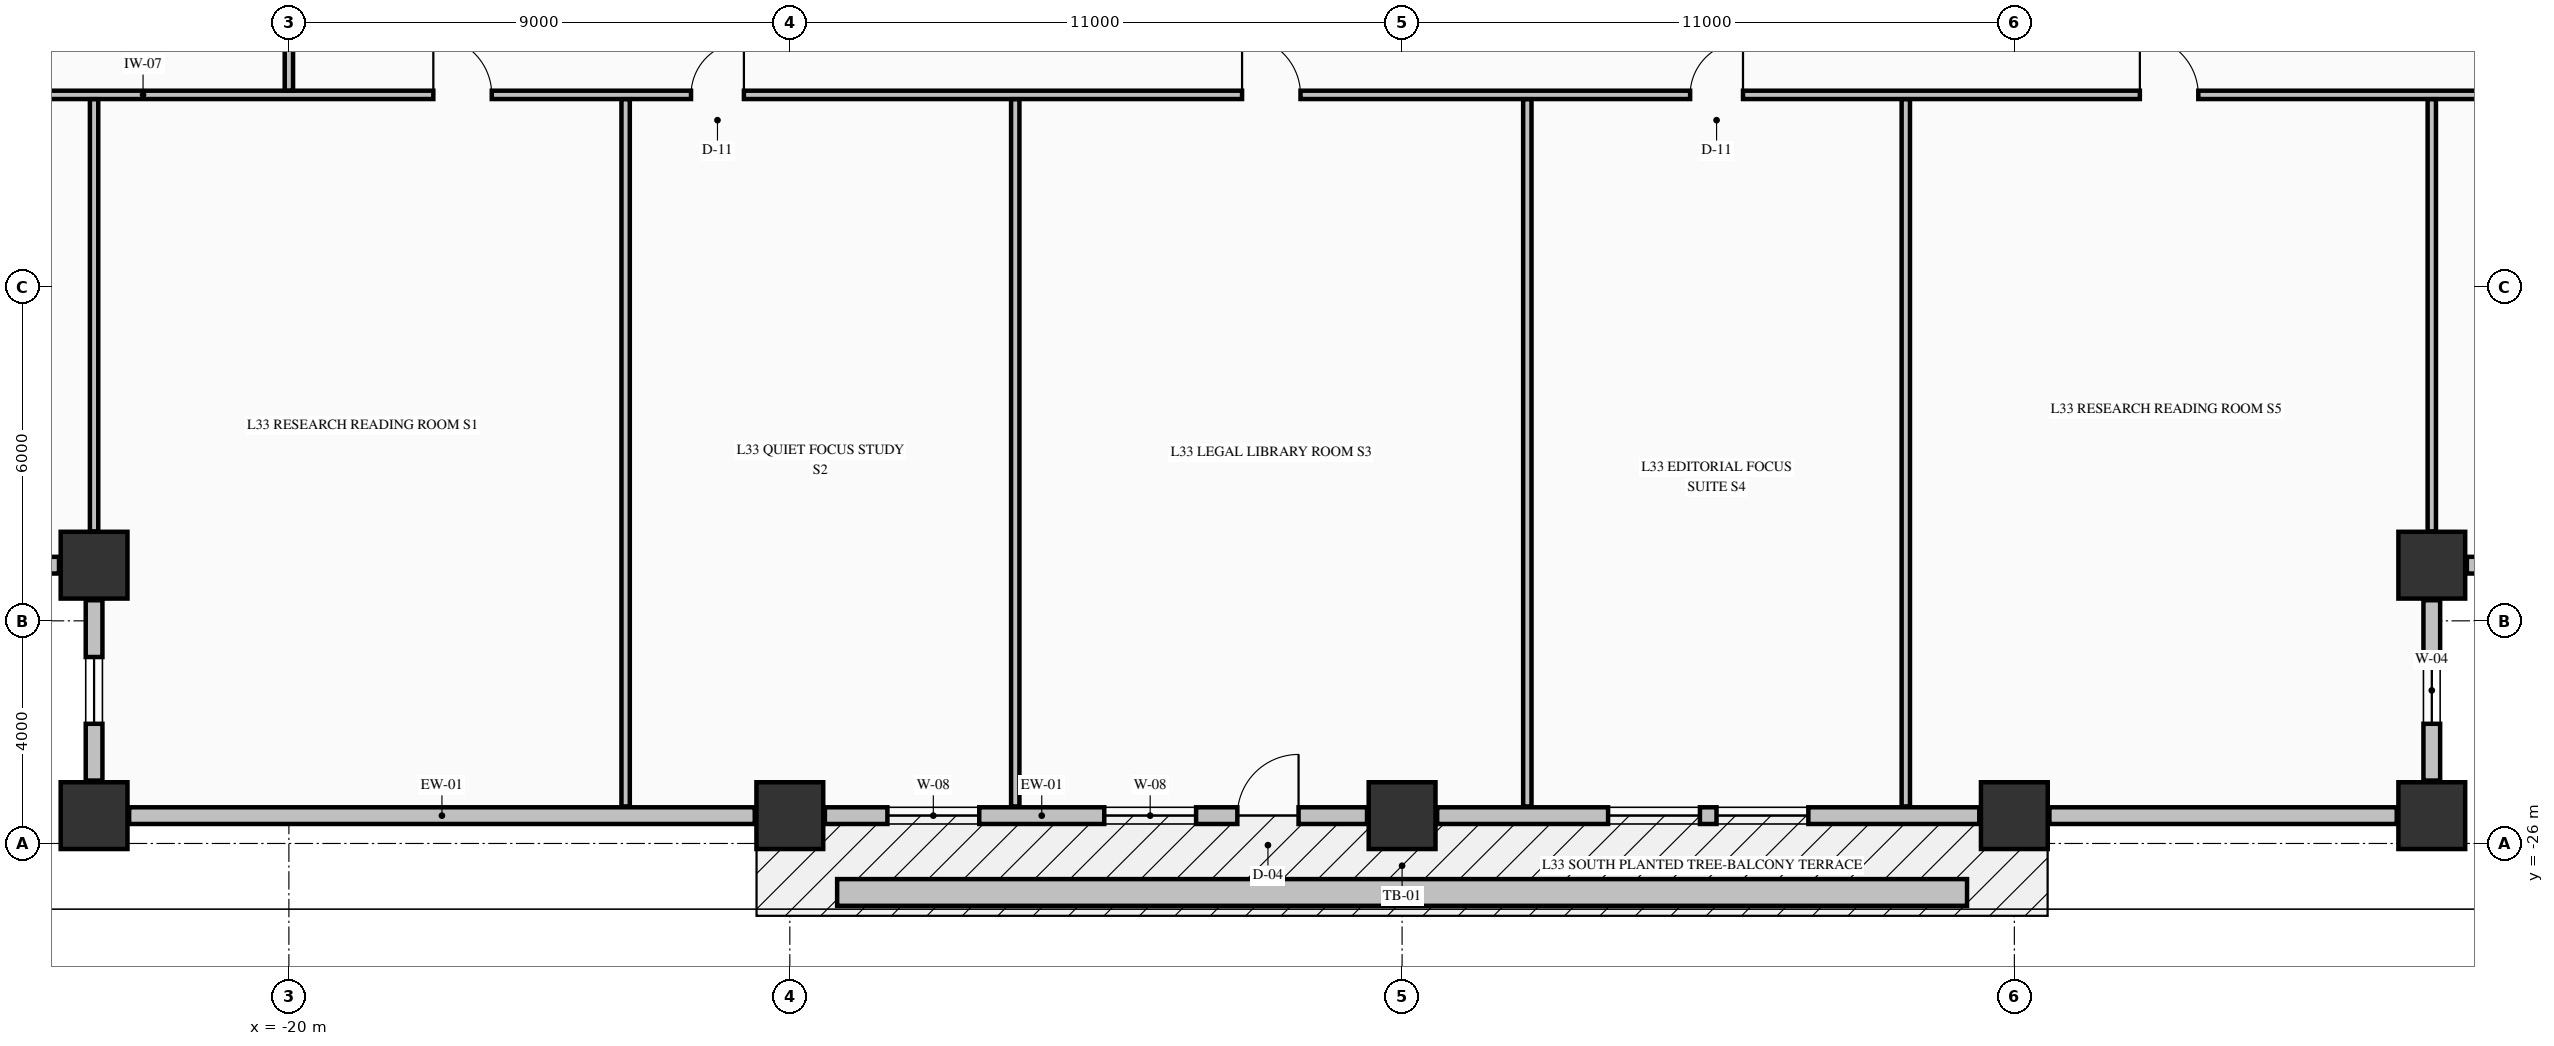
"""IFC4 building model, lengths in metres.
Left out: names, types, materials, properties, quantities, classifications, styles, units other than length and angle.
Written with IfcOpenShell. Run it as: python <this file> out.ifc"""

import sys

from ifc_helpers import new_model, si_unit, direction, frame, frame_2d, origin, origin_2d, place, context, subcontext, project, spatial, rectangle, extrude, element, fill, save


model = new_model("IFC4")
c1 = context("Model", 3, precision=1e-05, world=origin(), true_north=direction((0.0, 1.0)))
c2 = subcontext(c1, "Body", "Model", "MODEL_VIEW")
j1 = project(units=[si_unit("LENGTHUNIT", "METRE"), si_unit("PLANEANGLEUNIT", "RADIAN")], contexts=[c1])
p1 = place(None, origin())
s1 = spatial("IfcSite", under=j1, at=p1, CompositionType="ELEMENT")
p2 = place(p1, origin())
s2 = spatial("IfcBuilding", under=s1, at=p2, CompositionType="ELEMENT")
p3 = place(p2, frame((0.0, 0.0, 132.06)))
s3 = spatial("IfcBuildingStorey", under=s2, at=p3, CompositionType="ELEMENT", Elevation=132.06)
for number, where, z_axis, x_axis in (
    (1, (-23.5, -25.5, -0.25), (0.0, 0.0, 1.0), (1.0, 0.0, 0.0)),
    (2, (-11.0, -25.5, -0.25), (0.0, 0.0, 1.0), (1.0, 0.0, 0.0)),
    (3, (0.0, -25.5, -0.25), (0.0, 0.0, 1.0), (1.0, 0.0, 0.0)),
    (4, (11.0, -25.5, -0.25), (0.0, 0.0, 1.0), (1.0, 0.0, 0.0)),
    (5, (18.5, -25.5, -0.25), (0.0, 0.0, 1.0), (1.0, 0.0, 0.0)),
    (6, (-23.5, -21.0, -0.25), (0.0, 0.0, 1.0), (1.0, 0.0, 0.0)),
    (7, (18.5, -21.0, -0.25), (0.0, 0.0, 1.0), (1.0, 0.0, 0.0)),
):
    element("IfcColumn", number, at=place(p3, frame(where, z_axis=z_axis, x_axis=x_axis)), inside=s3, PredefinedType="COLUMN", context=c2, shape_type="SweptSolid", body=[
        extrude(rectangle(XDim=1.2, YDim=1.2, at=origin_2d()), origin(), (0.0, 0.0, 1.0), 3.57),
    ])
p4 = place(p3, frame((18.5, -24.87, 0.0), z_axis=(0.0, 0.0, 1.0), x_axis=(0.0, 1.0, 0.0)))
e8 = element("IfcWall", 8, at=p4, inside=s3, PredefinedType="STANDARD", context=c2, shape_type="SweptSolid", body=[
    extrude(rectangle(XDim=3.24, YDim=0.3, at=frame_2d((1.62, 0.0))), origin(), (0.0, 0.0, 1.0), 2.712),
])
p5 = place(p4, frame((1.02, 0.0, 0.82)))
e9 = element("IfcOpeningElement", 9, at=p5, cuts=e8, PredefinedType="OPENING", context=c2, shape_type="SweptSolid", body=[
    extrude(rectangle(XDim=1.2, YDim=1.65, at=frame_2d((0.6, 0.825))), frame((0.0, 0.16, 0.0), z_axis=(0.0, -1.0, 0.0), x_axis=(1.0, 0.0, 0.0)), (0.0, 0.0, 1.0), 0.32),
])
p6 = place(p3, frame((19.13, -21.0, 0.0), z_axis=(0.0, 0.0, 1.0), x_axis=(1.0, 0.0, 0.0)))
e10 = element("IfcWall", 10, at=p6, inside=s3, PredefinedType="STANDARD", context=c2, shape_type="SweptSolid", body=[
    extrude(rectangle(XDim=3.24, YDim=0.3, at=frame_2d((1.62, 0.0))), origin(), (0.0, 0.0, 1.0), 2.712),
])
p7 = place(p6, frame((1.02, 0.0, 0.82)))
e11 = element("IfcOpeningElement", 11, at=p7, cuts=e10, PredefinedType="OPENING", context=c2, shape_type="SweptSolid", body=[
    extrude(rectangle(XDim=1.2, YDim=1.65, at=frame_2d((0.6, 0.825))), frame((0.0, 0.16, 0.0), z_axis=(0.0, -1.0, 0.0), x_axis=(1.0, 0.0, 0.0)), (0.0, 0.0, 1.0), 0.32),
])
p8 = place(p3, frame((-27.37, -21.0, 0.0), z_axis=(0.0, 0.0, 1.0), x_axis=(1.0, 0.0, 0.0)))
e12 = element("IfcWall", 12, at=p8, inside=s3, PredefinedType="STANDARD", context=c2, shape_type="SweptSolid", body=[
    extrude(rectangle(XDim=3.24, YDim=0.3, at=frame_2d((1.62, 0.0))), origin(), (0.0, 0.0, 1.0), 2.712),
])
p9 = place(p8, frame((1.02, 0.0, 0.82)))
e13 = element("IfcOpeningElement", 13, at=p9, cuts=e12, PredefinedType="OPENING", context=c2, shape_type="SweptSolid", body=[
    extrude(rectangle(XDim=1.2, YDim=1.65, at=frame_2d((0.6, 0.825))), frame((0.0, 0.16, 0.0), z_axis=(0.0, -1.0, 0.0), x_axis=(1.0, 0.0, 0.0)), (0.0, 0.0, 1.0), 0.32),
])
p10 = place(p3, frame((-23.5, -21.63, 0.0), z_axis=(0.0, 0.0, 1.0), x_axis=(0.0, -1.0, 0.0)))
e14 = element("IfcWall", 14, at=p10, inside=s3, PredefinedType="STANDARD", context=c2, shape_type="SweptSolid", body=[
    extrude(rectangle(XDim=3.24, YDim=0.3, at=frame_2d((1.62, 0.0))), origin(), (0.0, 0.0, 1.0), 2.712),
])
p11 = place(p10, frame((1.02, 0.0, 0.82)))
e15 = element("IfcOpeningElement", 15, at=p11, cuts=e14, PredefinedType="OPENING", context=c2, shape_type="SweptSolid", body=[
    extrude(rectangle(XDim=1.2, YDim=1.65, at=frame_2d((0.6, 0.825))), frame((0.0, 0.16, 0.0), z_axis=(0.0, -1.0, 0.0), x_axis=(1.0, 0.0, 0.0)), (0.0, 0.0, 1.0), 0.32),
])
p12 = place(p3, frame((-22.87, -25.5, 0.0), z_axis=(0.0, 0.0, 1.0), x_axis=(1.0, 0.0, 0.0)))
e16 = element("IfcWall", 16, at=p12, inside=s3, PredefinedType="STANDARD", context=c2, shape_type="SweptSolid", body=[
    extrude(rectangle(XDim=11.24, YDim=0.3, at=frame_2d((5.62, 0.0))), origin(), (0.0, 0.0, 1.0), 2.712),
])
p13 = place(p3, frame((-10.37, -25.5, 0.0), z_axis=(0.0, 0.0, 1.0), x_axis=(1.0, 0.0, 0.0)))
e17 = element("IfcWall", 17, at=p13, inside=s3, PredefinedType="STANDARD", context=c2, shape_type="SweptSolid", body=[
    extrude(rectangle(XDim=9.74, YDim=0.3, at=frame_2d((4.87, 0.0))), origin(), (0.0, 0.0, 1.0), 2.712),
])
p14 = place(p13, frame((7.41, 0.0, 0.0)))
e18 = element("IfcOpeningElement", 18, at=p14, cuts=e17, PredefinedType="OPENING", context=c2, shape_type="SweptSolid", body=[
    extrude(rectangle(XDim=1.1, YDim=2.15, at=frame_2d((0.55, 1.075))), frame((0.0, 0.16, 0.0), z_axis=(0.0, -1.0, 0.0), x_axis=(1.0, 0.0, 0.0)), (0.0, 0.0, 1.0), 0.32),
])
p15 = place(p13, frame((1.123, 0.0, 0.8)))
e19 = element("IfcOpeningElement", 19, at=p15, cuts=e17, PredefinedType="OPENING", context=c2, shape_type="SweptSolid", body=[
    extrude(rectangle(XDim=1.65, YDim=1.7, at=frame_2d((0.825, 0.85))), frame((0.0, 0.16, 0.0), z_axis=(0.0, -1.0, 0.0), x_axis=(1.0, 0.0, 0.0)), (0.0, 0.0, 1.0), 0.32),
])
p16 = place(p13, frame((5.019, 0.0, 0.8)))
e20 = element("IfcOpeningElement", 20, at=p16, cuts=e17, PredefinedType="OPENING", context=c2, shape_type="SweptSolid", body=[
    extrude(rectangle(XDim=1.65, YDim=1.7, at=frame_2d((0.825, 0.85))), frame((0.0, 0.16, 0.0), z_axis=(0.0, -1.0, 0.0), x_axis=(1.0, 0.0, 0.0)), (0.0, 0.0, 1.0), 0.32),
])
p17 = place(p3, frame((0.63, -25.5, 0.0), z_axis=(0.0, 0.0, 1.0), x_axis=(1.0, 0.0, 0.0)))
e21 = element("IfcWall", 21, at=p17, inside=s3, PredefinedType="STANDARD", context=c2, shape_type="SweptSolid", body=[
    extrude(rectangle(XDim=9.74, YDim=0.3, at=frame_2d((4.87, 0.0))), origin(), (0.0, 0.0, 1.0), 2.712),
])
p18 = place(p17, frame((3.071, 0.0, 0.8)))
e22 = element("IfcOpeningElement", 22, at=p18, cuts=e21, PredefinedType="OPENING", context=c2, shape_type="SweptSolid", body=[
    extrude(rectangle(XDim=1.65, YDim=1.7, at=frame_2d((0.825, 0.85))), frame((0.0, 0.16, 0.0), z_axis=(0.0, -1.0, 0.0), x_axis=(1.0, 0.0, 0.0)), (0.0, 0.0, 1.0), 0.32),
])
p19 = place(p17, frame((5.019, 0.0, 0.8)))
e23 = element("IfcOpeningElement", 23, at=p19, cuts=e21, PredefinedType="OPENING", context=c2, shape_type="SweptSolid", body=[
    extrude(rectangle(XDim=1.65, YDim=1.7, at=frame_2d((0.825, 0.85))), frame((0.0, 0.16, 0.0), z_axis=(0.0, -1.0, 0.0), x_axis=(1.0, 0.0, 0.0)), (0.0, 0.0, 1.0), 0.32),
])
p20 = place(p3, frame((11.63, -25.5, 0.0), z_axis=(0.0, 0.0, 1.0), x_axis=(1.0, 0.0, 0.0)))
e24 = element("IfcWall", 24, at=p20, inside=s3, PredefinedType="STANDARD", context=c2, shape_type="SweptSolid", body=[
    extrude(rectangle(XDim=6.24, YDim=0.3, at=frame_2d((3.12, 0.0))), origin(), (0.0, 0.0, 1.0), 2.712),
])
p21 = place(p3, frame((-27.835, -12.55, 0.0), z_axis=(0.0, 0.0, 1.0), x_axis=(1.0, 0.0, 0.0)))
e25 = element("IfcWall", 25, at=p21, inside=s3, PredefinedType="PARTITIONING", context=c2, shape_type="SweptSolid", body=[
    extrude(rectangle(XDim=50.67, YDim=0.15, at=frame_2d((25.335, 0.0))), origin(), (0.0, 0.0, 1.0), 3.32),
])
p22 = place(p21, frame((10.43, 0.0, 0.0)))
e26 = element("IfcOpeningElement", 26, at=p22, cuts=e25, PredefinedType="OPENING", context=c2, shape_type="SweptSolid", body=[
    extrude(rectangle(XDim=1.05, YDim=2.15, at=frame_2d((0.525, 1.075))), frame((0.0, 0.085, 0.0), z_axis=(0.0, -1.0, 0.0), x_axis=(1.0, 0.0, 0.0)), (0.0, 0.0, 1.0), 0.17),
])
p23 = place(p21, frame((15.06, 0.0, 0.0)))
e27 = element("IfcOpeningElement", 27, at=p23, cuts=e25, PredefinedType="OPENING", context=c2, shape_type="SweptSolid", body=[
    extrude(rectangle(XDim=0.95, YDim=2.15, at=frame_2d((0.475, 1.075))), frame((0.0, 0.085, 0.0), z_axis=(0.0, -1.0, 0.0), x_axis=(1.0, 0.0, 0.0)), (0.0, 0.0, 1.0), 0.17),
])
p24 = place(p21, frame((24.96, 0.0, 0.0)))
e28 = element("IfcOpeningElement", 28, at=p24, cuts=e25, PredefinedType="OPENING", context=c2, shape_type="SweptSolid", body=[
    extrude(rectangle(XDim=1.05, YDim=2.15, at=frame_2d((0.525, 1.075))), frame((0.0, 0.085, 0.0), z_axis=(0.0, -1.0, 0.0), x_axis=(1.0, 0.0, 0.0)), (0.0, 0.0, 1.0), 0.17),
])
p25 = place(p21, frame((33.01, 0.0, 0.0)))
e29 = element("IfcOpeningElement", 29, at=p25, cuts=e25, PredefinedType="OPENING", context=c2, shape_type="SweptSolid", body=[
    extrude(rectangle(XDim=0.95, YDim=2.15, at=frame_2d((0.475, 1.075))), frame((0.0, 0.085, 0.0), z_axis=(0.0, -1.0, 0.0), x_axis=(1.0, 0.0, 0.0)), (0.0, 0.0, 1.0), 0.17),
])
p26 = place(p21, frame((41.09, 0.0, 0.0)))
e30 = element("IfcOpeningElement", 30, at=p26, cuts=e25, PredefinedType="OPENING", context=c2, shape_type="SweptSolid", body=[
    extrude(rectangle(XDim=1.05, YDim=2.15, at=frame_2d((0.525, 1.075))), frame((0.0, 0.085, 0.0), z_axis=(0.0, -1.0, 0.0), x_axis=(1.0, 0.0, 0.0)), (0.0, 0.0, 1.0), 0.17),
])
p27 = place(p3, frame((-23.5, -20.394, 0.0), z_axis=(0.0, 0.0, 1.0), x_axis=(0.0, 1.0, 0.0)))
e31 = element("IfcWall", 31, at=p27, inside=s3, PredefinedType="PARTITIONING", context=c2, shape_type="SweptSolid", body=[
    extrude(rectangle(XDim=7.766, YDim=0.15, at=frame_2d((3.883, 0.0))), origin(), (0.0, 0.0, 1.0), 3.32),
])
p28 = place(p3, frame((-20.0, -12.472, 0.0), z_axis=(0.0, 0.0, 1.0), x_axis=(0.0, 1.0, 0.0)))
e32 = element("IfcWall", 32, at=p28, inside=s3, PredefinedType="PARTITIONING", context=c2, shape_type="SweptSolid", body=[
    extrude(rectangle(XDim=2.016, YDim=0.15, at=frame_2d((1.008, 0.0))), origin(), (0.0, 0.0, 1.0), 2.81),
])
p29 = place(p28, frame((0.747, 0.0, 0.0)))
e33 = element("IfcOpeningElement", 33, at=p29, cuts=e32, PredefinedType="OPENING", context=c2, shape_type="SweptSolid", body=[
    extrude(rectangle(XDim=0.95, YDim=2.15, at=frame_2d((0.475, 1.075))), frame((0.0, 0.085, 0.0), z_axis=(0.0, -1.0, 0.0), x_axis=(1.0, 0.0, 0.0)), (0.0, 0.0, 1.0), 0.17),
])
for number, where, z_axis, x_axis in (
    (34, (-13.95, -25.335, 0.0), (0.0, 0.0, 1.0), (0.0, 1.0, 0.0)),
    (35, (-6.95, -25.335, 0.0), (0.0, 0.0, 1.0), (0.0, 1.0, 0.0)),
    (36, (2.25, -25.335, 0.0), (0.0, 0.0, 1.0), (0.0, 1.0, 0.0)),
    (37, (9.05, -25.335, 0.0), (0.0, 0.0, 1.0), (0.0, 1.0, 0.0)),
):
    element("IfcWall", number, at=place(p3, frame(where, z_axis=z_axis, x_axis=x_axis)), inside=s3, PredefinedType="PARTITIONING", context=c2, shape_type="SweptSolid", body=[
        extrude(rectangle(XDim=12.707, YDim=0.15, at=frame_2d((6.354, 0.0))), origin(), (0.0, 0.0, 1.0), 3.32),
    ])
p30 = place(p3, frame((18.5, -20.394, 0.0), z_axis=(0.0, 0.0, 1.0), x_axis=(0.0, 1.0, 0.0)))
e38 = element("IfcWall", 38, at=p30, inside=s3, PredefinedType="PARTITIONING", context=c2, shape_type="SweptSolid", body=[
    extrude(rectangle(XDim=7.766, YDim=0.15, at=frame_2d((3.883, 0.0))), origin(), (0.0, 0.0, 1.0), 3.32),
])
p31 = place(p3, frame((-10.15, -26.88, -0.04), z_axis=(0.0, 0.0, 1.0), x_axis=(1.0, 0.0, 0.0)))
e39 = element("IfcWall", 39, at=p31, inside=s3, PredefinedType="PARAPET", context=c2, shape_type="SweptSolid", body=[
    extrude(rectangle(XDim=20.3, YDim=0.48, at=frame_2d((10.15, 0.0))), origin(), (0.0, 0.0, 1.0), 0.52),
])
p32 = place(p5, origin())
e40 = element("IfcWindow", 40, at=p32, inside=s3, PartitioningType="SINGLE_PANEL", PredefinedType="WINDOW", context=c2, shape_type="SweptSolid", body=[
    extrude(rectangle(XDim=1.2, YDim=1.65, at=frame_2d((0.6, 0.825))), frame((0.0, 0.03, 0.0), z_axis=(0.0, -1.0, 0.0), x_axis=(1.0, 0.0, 0.0)), (0.0, 0.0, 1.0), 0.06),
])
fill(e9, e40)
p33 = place(p11, origin())
e41 = element("IfcWindow", 41, at=p33, inside=s3, PartitioningType="SINGLE_PANEL", PredefinedType="WINDOW", context=c2, shape_type="SweptSolid", body=[
    extrude(rectangle(XDim=1.2, YDim=1.65, at=frame_2d((0.6, 0.825))), frame((0.0, 0.03, 0.0), z_axis=(0.0, -1.0, 0.0), x_axis=(1.0, 0.0, 0.0)), (0.0, 0.0, 1.0), 0.06),
])
fill(e15, e41)
p34 = place(p14, origin())
e42 = element("IfcDoor", 42, at=p34, inside=s3, OperationType="SINGLE_SWING_RIGHT", PredefinedType="DOOR", context=c2, shape_type="SweptSolid", body=[
    extrude(rectangle(XDim=1.1, YDim=2.15, at=frame_2d((0.55, 1.075))), frame((0.0, 0.025, 0.0), z_axis=(0.0, -1.0, 0.0), x_axis=(1.0, 0.0, 0.0)), (0.0, 0.0, 1.0), 0.05),
])
fill(e18, e42)
p35 = place(p15, origin())
e43 = element("IfcWindow", 43, at=p35, inside=s3, PartitioningType="SINGLE_PANEL", PredefinedType="WINDOW", context=c2, shape_type="SweptSolid", body=[
    extrude(rectangle(XDim=1.65, YDim=1.7, at=frame_2d((0.825, 0.85))), frame((0.0, 0.03, 0.0), z_axis=(0.0, -1.0, 0.0), x_axis=(1.0, 0.0, 0.0)), (0.0, 0.0, 1.0), 0.06),
])
fill(e19, e43)
p36 = place(p16, origin())
e44 = element("IfcWindow", 44, at=p36, inside=s3, PartitioningType="SINGLE_PANEL", PredefinedType="WINDOW", context=c2, shape_type="SweptSolid", body=[
    extrude(rectangle(XDim=1.65, YDim=1.7, at=frame_2d((0.825, 0.85))), frame((0.0, 0.03, 0.0), z_axis=(0.0, -1.0, 0.0), x_axis=(1.0, 0.0, 0.0)), (0.0, 0.0, 1.0), 0.06),
])
fill(e20, e44)
p37 = place(p18, origin())
e45 = element("IfcWindow", 45, at=p37, inside=s3, PartitioningType="SINGLE_PANEL", PredefinedType="WINDOW", context=c2, shape_type="SweptSolid", body=[
    extrude(rectangle(XDim=1.65, YDim=1.7, at=frame_2d((0.825, 0.85))), frame((0.0, 0.03, 0.0), z_axis=(0.0, -1.0, 0.0), x_axis=(1.0, 0.0, 0.0)), (0.0, 0.0, 1.0), 0.06),
])
fill(e22, e45)
p38 = place(p19, origin())
e46 = element("IfcWindow", 46, at=p38, inside=s3, PartitioningType="SINGLE_PANEL", PredefinedType="WINDOW", context=c2, shape_type="SweptSolid", body=[
    extrude(rectangle(XDim=1.65, YDim=1.7, at=frame_2d((0.825, 0.85))), frame((0.0, 0.03, 0.0), z_axis=(0.0, -1.0, 0.0), x_axis=(1.0, 0.0, 0.0)), (0.0, 0.0, 1.0), 0.06),
])
fill(e23, e46)
p39 = place(p22, origin())
e47 = element("IfcDoor", 47, at=p39, inside=s3, OperationType="SINGLE_SWING_LEFT", PredefinedType="DOOR", context=c2, shape_type="SweptSolid", body=[
    extrude(rectangle(XDim=1.05, YDim=2.15, at=frame_2d((0.525, 1.075))), frame((0.0, 0.025, 0.0), z_axis=(0.0, -1.0, 0.0), x_axis=(1.0, 0.0, 0.0)), (0.0, 0.0, 1.0), 0.05),
])
fill(e26, e47)
p40 = place(p23, origin())
e48 = element("IfcDoor", 48, at=p40, inside=s3, OperationType="SINGLE_SWING_RIGHT", PredefinedType="DOOR", context=c2, shape_type="SweptSolid", body=[
    extrude(rectangle(XDim=0.95, YDim=2.15, at=frame_2d((0.475, 1.075))), frame((0.0, 0.025, 0.0), z_axis=(0.0, -1.0, 0.0), x_axis=(1.0, 0.0, 0.0)), (0.0, 0.0, 1.0), 0.05),
])
fill(e27, e48)
p41 = place(p24, origin())
e49 = element("IfcDoor", 49, at=p41, inside=s3, OperationType="SINGLE_SWING_LEFT", PredefinedType="DOOR", context=c2, shape_type="SweptSolid", body=[
    extrude(rectangle(XDim=1.05, YDim=2.15, at=frame_2d((0.525, 1.075))), frame((0.0, 0.025, 0.0), z_axis=(0.0, -1.0, 0.0), x_axis=(1.0, 0.0, 0.0)), (0.0, 0.0, 1.0), 0.05),
])
fill(e28, e49)
p42 = place(p25, origin())
e50 = element("IfcDoor", 50, at=p42, inside=s3, OperationType="SINGLE_SWING_RIGHT", PredefinedType="DOOR", context=c2, shape_type="SweptSolid", body=[
    extrude(rectangle(XDim=0.95, YDim=2.15, at=frame_2d((0.475, 1.075))), frame((0.0, 0.025, 0.0), z_axis=(0.0, -1.0, 0.0), x_axis=(1.0, 0.0, 0.0)), (0.0, 0.0, 1.0), 0.05),
])
fill(e29, e50)
p43 = place(p26, origin())
e51 = element("IfcDoor", 51, at=p43, inside=s3, OperationType="SINGLE_SWING_LEFT", PredefinedType="DOOR", context=c2, shape_type="SweptSolid", body=[
    extrude(rectangle(XDim=1.05, YDim=2.15, at=frame_2d((0.525, 1.075))), frame((0.0, 0.025, 0.0), z_axis=(0.0, -1.0, 0.0), x_axis=(1.0, 0.0, 0.0)), (0.0, 0.0, 1.0), 0.05),
])
fill(e30, e51)
save(model, sys.argv[1])
